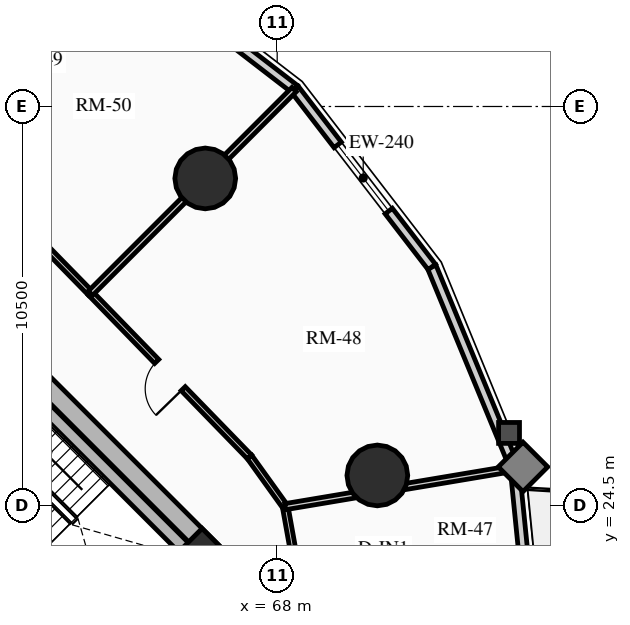
"""IFC4 building model, lengths in metres.
Left out: names, types, materials, properties, quantities, classifications, styles, units other than length and angle.
Written with IfcOpenShell. Run it as: python <this file> out.ifc"""

import sys

from ifc_helpers import new_model, si_unit, direction, frame, frame_2d, origin, origin_2d, place, context, subcontext, project, spatial, rectangle, circle, extrude, source, transform, mapped, element, fill, save


model = new_model("IFC4")
c1 = context("Model", 3, precision=1e-05, world=origin(), true_north=direction((0.0, 1.0)))
c2 = subcontext(c1, "Body", "Model", "MODEL_VIEW")
j1 = project(units=[si_unit("LENGTHUNIT", "METRE"), si_unit("PLANEANGLEUNIT", "RADIAN")], contexts=[c1])
p1 = place(None, origin())
s1 = spatial("IfcSite", under=j1, at=p1, CompositionType="ELEMENT")
p2 = place(p1, origin())
s2 = spatial("IfcBuilding", under=s1, at=p2, CompositionType="ELEMENT")
p3 = place(p2, frame((0.0, 0.0, 30.73)))
s3 = spatial("IfcBuildingStorey", under=s2, at=p3, CompositionType="ELEMENT", Elevation=30.73)
p4 = place(p3, frame((66.339, 23.227, 0.0), z_axis=(0.0, 0.0, 1.0), x_axis=(-0.707106781187, 0.707106781187, 0.0)))
e1 = element("IfcWall", 1, at=p4, inside=s3, PredefinedType="SHEAR", context=c2, shape_type="SweptSolid", body=[
    extrude(rectangle(XDim=14.3, YDim=0.5, at=frame_2d((7.15, 0.0))), origin(), (0.0, 0.0, 1.0), 2.91),
])
p5 = place(p3, frame((58.596, 15.838, 0.0), z_axis=(0.0, 0.0, 1.0), x_axis=(0.707106781187, 0.707106781187, 0.0)))
e2 = element("IfcWall", 2, at=p5, inside=s3, PredefinedType="SHEAR", context=c2, shape_type="SweptSolid", body=[
    extrude(rectangle(XDim=10.7, YDim=0.5, at=frame_2d((5.35, 0.0))), origin(), (0.0, 0.0, 1.0), 2.91),
])
m1 = source(origin(), c2, "Body", "SweptSolid", [
    extrude(rectangle(XDim=1.5, YDim=2.02, at=frame_2d((0.75, 1.01))), frame((0.0, 0.26, 0.0), z_axis=(0.0, -1.0, 0.0), x_axis=(1.0, 0.0, 0.0)), (0.0, 0.0, 1.0), 0.52),
])
p6 = place(p5, frame((5.45, 0.0, 0.0)))
e3 = element("IfcOpeningElement", 3, at=p6, cuts=e2, PredefinedType="OPENING", context=c2, shape_type="MappedRepresentation", body=[
    mapped(m1, transform((0.0, 0.0, 0.0), x_axis=(1.0, 0.0, 0.0), y_axis=(0.0, 1.0, 0.0), z_axis=(0.0, 0.0, 1.0), scale=1.0)),
])
p7 = place(p3, frame((63.662, 20.904, 0.0), z_axis=(0.0, 0.0, 1.0), x_axis=(-0.707106781187, 0.707106781187, 0.0)))
e4 = element("IfcWall", 4, at=p7, inside=s3, PredefinedType="SHEAR", context=c2, shape_type="SweptSolid", body=[
    extrude(rectangle(XDim=13.8, YDim=0.35, at=frame_2d((6.9, 0.0))), origin(), (0.0, 0.0, 1.0), 2.91),
])
m2 = source(origin(), c2, "Body", "SweptSolid", [
    extrude(rectangle(XDim=1.1, YDim=2.015, at=frame_2d((0.55, 1.007))), frame((0.0, 0.185, 0.0), z_axis=(0.0, -1.0, 0.0), x_axis=(1.0, 0.0, 0.0)), (0.0, 0.0, 1.0), 0.37),
])
p8 = place(p7, frame((10.025, 0.0, 0.0)))
e5 = element("IfcOpeningElement", 5, at=p8, cuts=e4, PredefinedType="OPENING", context=c2, shape_type="MappedRepresentation", body=[
    mapped(m2, transform((0.0, 0.0, 0.0), x_axis=(1.0, 0.0, 0.0), y_axis=(0.0, 1.0, 0.0), z_axis=(0.0, 0.0, 1.0), scale=1.0)),
])
p9 = place(p7, frame((12.025, 0.0, 0.0)))
e6 = element("IfcOpeningElement", 6, at=p9, cuts=e4, PredefinedType="OPENING", context=c2, shape_type="MappedRepresentation", body=[
    mapped(m2, transform((0.0, 0.0, 0.0), x_axis=(1.0, 0.0, 0.0), y_axis=(0.0, 1.0, 0.0), z_axis=(0.0, 0.0, 1.0), scale=1.0)),
])
m3 = source(origin(), c2, "Body", "SweptSolid", [
    extrude(rectangle(XDim=1.15, YDim=2.02, at=frame_2d((0.575, 1.01))), frame((0.0, 0.185, 0.0), z_axis=(0.0, -1.0, 0.0), x_axis=(1.0, 0.0, 0.0)), (0.0, 0.0, 1.0), 0.37),
])
p10 = place(p7, frame((5.33, 0.0, 0.0)))
e7 = element("IfcOpeningElement", 7, at=p10, cuts=e4, PredefinedType="OPENING", context=c2, shape_type="MappedRepresentation", body=[
    mapped(m3, transform((0.0, 0.0, 0.0), x_axis=(1.0, 0.0, 0.0), y_axis=(0.0, 1.0, 0.0), z_axis=(0.0, 0.0, 1.0), scale=1.0)),
])
p11 = place(p3, frame((65.847, 23.089, 0.0), z_axis=(0.0, 0.0, 1.0), x_axis=(-0.707106781187, 0.707106781187, 0.0)))
e8 = element("IfcWall", 8, at=p11, inside=s3, PredefinedType="SHEAR", context=c2, shape_type="SweptSolid", body=[
    extrude(rectangle(XDim=6.745, YDim=0.35, at=frame_2d((3.373, 0.0))), origin(), (0.0, 0.0, 1.0), 2.91),
])
p12 = place(p3, frame((66.024, 23.294, 0.0), z_axis=(0.0, 0.0, 1.0), x_axis=(0.707106781187, 0.707106781187, 0.0)))
e9 = element("IfcColumn", 9, at=p12, inside=s3, PredefinedType="COLUMN", context=c2, shape_type="SweptSolid", body=[
    extrude(rectangle(XDim=0.85, YDim=0.85, at=origin_2d()), origin(), (0.0, 0.0, 1.0), 2.91),
])
for number, where, z_axis, x_axis in (
    (10, (66.107, 33.107, 0.0), (0.0, 0.0, 1.0), (1.0, 0.0, 0.0)),
    (11, (70.635, 25.291, 0.0), (0.0, 0.0, 1.0), (1.0, 0.0, 0.0)),
):
    element("IfcColumn", number, at=place(p3, frame(where, z_axis=z_axis, x_axis=x_axis)), inside=s3, PredefinedType="USERDEFINED", context=c2, shape_type="SweptSolid", body=[
        extrude(circle(Radius=0.8, at=origin_2d()), origin(), (0.0, 0.0, 1.0), 2.91),
    ])
p13 = place(p3, frame((63.778, 39.068, 0.0), z_axis=(0.0, 0.0, 1.0), x_axis=(0.792020182601, -0.610494906082, 0.0)))
e12 = element("IfcWall", 12, at=p13, inside=s3, PredefinedType="SOLIDWALL", context=c2, shape_type="SweptSolid", body=[
    extrude(rectangle(XDim=5.911, YDim=0.24, at=frame_2d((2.956, 0.0))), origin(), (0.0, 0.0, 1.0), 2.073),
])
p14 = place(p3, frame((74.251, 25.482, 0.0), z_axis=(0.0, 0.0, 1.0), x_axis=(0.100190592135, -0.994968263437, 0.0)))
e13 = element("IfcWall", 13, at=p14, inside=s3, PredefinedType="SOLIDWALL", context=c2, shape_type="SweptSolid", body=[
    extrude(rectangle(XDim=5.419, YDim=0.24, at=frame_2d((2.71, 0.0))), origin(), (0.0, 0.0, 1.0), 2.073),
])
m4 = source(origin(), c2, "Body", "SweptSolid", [
    extrude(rectangle(XDim=1.15, YDim=2.005, at=frame_2d((0.575, 1.002))), frame((0.0, 0.13, 0.0), z_axis=(0.0, -1.0, 0.0), x_axis=(1.0, 0.0, 0.0)), (0.0, 0.0, 1.0), 0.26),
])
p15 = place(p14, frame((2.135, 0.0, 0.0)))
e14 = element("IfcOpeningElement", 14, at=p15, cuts=e13, PredefinedType="OPENING", context=c2, shape_type="MappedRepresentation", body=[
    mapped(m4, transform((0.0, 0.0, 0.0), x_axis=(1.0, 0.0, 0.0), y_axis=(0.0, 1.0, 0.0), z_axis=(0.0, 0.0, 1.0), scale=1.0)),
])
p16 = place(p3, frame((72.068, 30.778, 0.0), z_axis=(0.0, 0.0, 1.0), x_axis=(0.381077764176, -0.924542988536, 0.0)))
e15 = element("IfcWall", 15, at=p16, inside=s3, PredefinedType="SOLIDWALL", context=c2, shape_type="SweptSolid", body=[
    extrude(rectangle(XDim=5.728, YDim=0.24, at=frame_2d((2.864, 0.0))), origin(), (0.0, 0.0, 1.0), 2.073),
])
p17 = place(p3, frame((68.459, 35.459, 0.0), z_axis=(0.0, 0.0, 1.0), x_axis=(0.610494906082, -0.792020182601, 0.0)))
e16 = element("IfcWall", 16, at=p17, inside=s3, PredefinedType="SOLIDWALL", context=c2, shape_type="SweptSolid", body=[
    extrude(rectangle(XDim=5.911, YDim=0.24, at=frame_2d((2.956, 0.0))), origin(), (0.0, 0.0, 1.0), 2.073),
])
m5 = source(origin(), c2, "Body", "SweptSolid", [
    extrude(rectangle(XDim=2.2, YDim=1.35, at=frame_2d((1.1, 0.675))), frame((0.0, 0.13, 0.0), z_axis=(0.0, -1.0, 0.0), x_axis=(1.0, 0.0, 0.0)), (0.0, 0.0, 1.0), 0.26),
])
p18 = place(p17, frame((1.855, 0.0, 0.65)))
e17 = element("IfcOpeningElement", 17, at=p18, cuts=e16, PredefinedType="OPENING", context=c2, shape_type="MappedRepresentation", body=[
    mapped(m5, transform((0.0, 0.0, 0.0), x_axis=(1.0, 0.0, 0.0), y_axis=(0.0, 1.0, 0.0), z_axis=(0.0, 0.0, 1.0), scale=1.0)),
])
p19 = place(p3, frame((63.086, 30.086, 0.0), z_axis=(0.0, 0.0, 1.0), x_axis=(-0.699075897379, 0.715047473741, 0.0)))
e18 = element("IfcWall", 18, at=p19, inside=s3, PredefinedType="PARTITIONING", context=c2, shape_type="SweptSolid", body=[
    extrude(rectangle(XDim=6.114, YDim=0.15, at=frame_2d((3.057, 0.0))), origin(), (0.0, 0.0, 1.0), 2.159),
])
m6 = source(origin(), c2, "Body", "SweptSolid", [
    extrude(rectangle(XDim=1.05, YDim=2.015, at=frame_2d((0.525, 1.007))), frame((0.0, 0.085, 0.0), z_axis=(0.0, -1.0, 0.0), x_axis=(1.0, 0.0, 0.0)), (0.0, 0.0, 1.0), 0.17),
])
p20 = place(p19, frame((2.532, 0.0, 0.0)))
e19 = element("IfcOpeningElement", 19, at=p20, cuts=e18, PredefinedType="OPENING", context=c2, shape_type="MappedRepresentation", body=[
    mapped(m6, transform((0.0, 0.0, 0.0), x_axis=(1.0, 0.0, 0.0), y_axis=(0.0, 1.0, 0.0), z_axis=(0.0, 0.0, 1.0), scale=1.0)),
])
p21 = place(p3, frame((68.456, 23.11, 0.0), z_axis=(0.0, 0.0, 1.0), x_axis=(-0.1772522795, 0.984165448191, 0.0)))
e20 = element("IfcWall", 20, at=p21, inside=s3, PredefinedType="PARTITIONING", context=c2, shape_type="SweptSolid", body=[
    extrude(rectangle(XDim=1.382, YDim=0.15, at=frame_2d((0.691, 0.0))), origin(), (0.0, 0.0, 1.0), 2.159),
])
p22 = place(p3, frame((68.211, 24.469, 0.0), z_axis=(0.0, 0.0, 1.0), x_axis=(-0.583012141368, 0.812463441034, 0.0)))
e21 = element("IfcWall", 21, at=p22, inside=s3, PredefinedType="PARTITIONING", context=c2, shape_type="SweptSolid", body=[
    extrude(rectangle(XDim=1.613, YDim=0.15, at=frame_2d((0.807, 0.0))), origin(), (0.0, 0.0, 1.0), 2.205),
])
p23 = place(p3, frame((67.27, 25.78, 0.0), z_axis=(0.0, 0.0, 1.0), x_axis=(-0.696847842907, 0.717218992942, 0.0)))
e22 = element("IfcWall", 22, at=p23, inside=s3, PredefinedType="PARTITIONING", context=c2, shape_type="SweptSolid", body=[
    extrude(rectangle(XDim=6.004, YDim=0.15, at=frame_2d((3.002, 0.0))), origin(), (0.0, 0.0, 1.0), 2.635),
])
m7 = source(origin(), c2, "Body", "SweptSolid", [
    extrude(rectangle(XDim=1.0, YDim=2.015, at=frame_2d((0.5, 1.007))), frame((0.0, 0.085, 0.0), z_axis=(0.0, -1.0, 0.0), x_axis=(1.0, 0.0, 0.0)), (0.0, 0.0, 1.0), 0.17),
])
p24 = place(p23, frame((2.502, 0.0, 0.0)))
e23 = element("IfcOpeningElement", 23, at=p24, cuts=e22, PredefinedType="OPENING", context=c2, shape_type="MappedRepresentation", body=[
    mapped(m7, transform((0.0, 0.0, 0.0), x_axis=(1.0, 0.0, 0.0), y_axis=(0.0, 1.0, 0.0), z_axis=(0.0, 0.0, 1.0), scale=1.0)),
])
p25 = place(p3, frame((63.086, 30.086, 0.0), z_axis=(0.0, 0.0, 1.0), x_axis=(0.707106781187, 0.707106781187, 0.0)))
e24 = element("IfcWall", 24, at=p25, inside=s3, PredefinedType="PARTITIONING", context=c2, shape_type="SweptSolid", body=[
    extrude(rectangle(XDim=7.579, YDim=0.16, at=frame_2d((3.79, 0.0))), origin(), (0.0, 0.0, 1.0), 2.073),
])
p26 = place(p3, frame((68.211, 24.469, 0.0), z_axis=(0.0, 0.0, 1.0), x_axis=(0.986231309699, 0.165371713934, 0.0)))
e25 = element("IfcWall", 25, at=p26, inside=s3, PredefinedType="PARTITIONING", context=c2, shape_type="SweptSolid", body=[
    extrude(rectangle(XDim=6.104, YDim=0.16, at=frame_2d((3.052, 0.0))), origin(), (0.0, 0.0, 1.0), 2.073),
])
m8 = source(origin(), c2, "Body", "SweptSolid", [
    extrude(rectangle(XDim=2.2, YDim=1.35, at=frame_2d((1.1, 0.675))), frame((0.0, 0.03, 0.0), z_axis=(0.0, -1.0, 0.0), x_axis=(1.0, 0.0, 0.0)), (0.0, 0.0, 1.0), 0.06),
])
p27 = place(p18, origin())
e26 = element("IfcWindow", 26, at=p27, inside=s3, PartitioningType="DOUBLE_PANEL_VERTICAL", PredefinedType="WINDOW", context=c2, shape_type="MappedRepresentation", body=[
    mapped(m8, transform((0.0, 0.0, 0.0), x_axis=(1.0, 0.0, 0.0), y_axis=(0.0, 1.0, 0.0), z_axis=(0.0, 0.0, 1.0), scale=1.0)),
])
fill(e17, e26)
m9 = source(origin(), c2, "Body", "SweptSolid", [
    extrude(rectangle(XDim=1.0, YDim=2.015, at=frame_2d((0.5, 1.007))), frame((0.0, 0.025, 0.0), z_axis=(0.0, -1.0, 0.0), x_axis=(1.0, 0.0, 0.0)), (0.0, 0.0, 1.0), 0.05),
])
p28 = place(p24, origin())
e27 = element("IfcDoor", 27, at=p28, inside=s3, OperationType="SINGLE_SWING_LEFT", PredefinedType="DOOR", context=c2, shape_type="MappedRepresentation", body=[
    mapped(m9, transform((0.0, 0.0, 0.0), x_axis=(1.0, 0.0, 0.0), y_axis=(0.0, 1.0, 0.0), z_axis=(0.0, 0.0, 1.0), scale=1.0)),
])
fill(e23, e27)
save(model, sys.argv[1])
